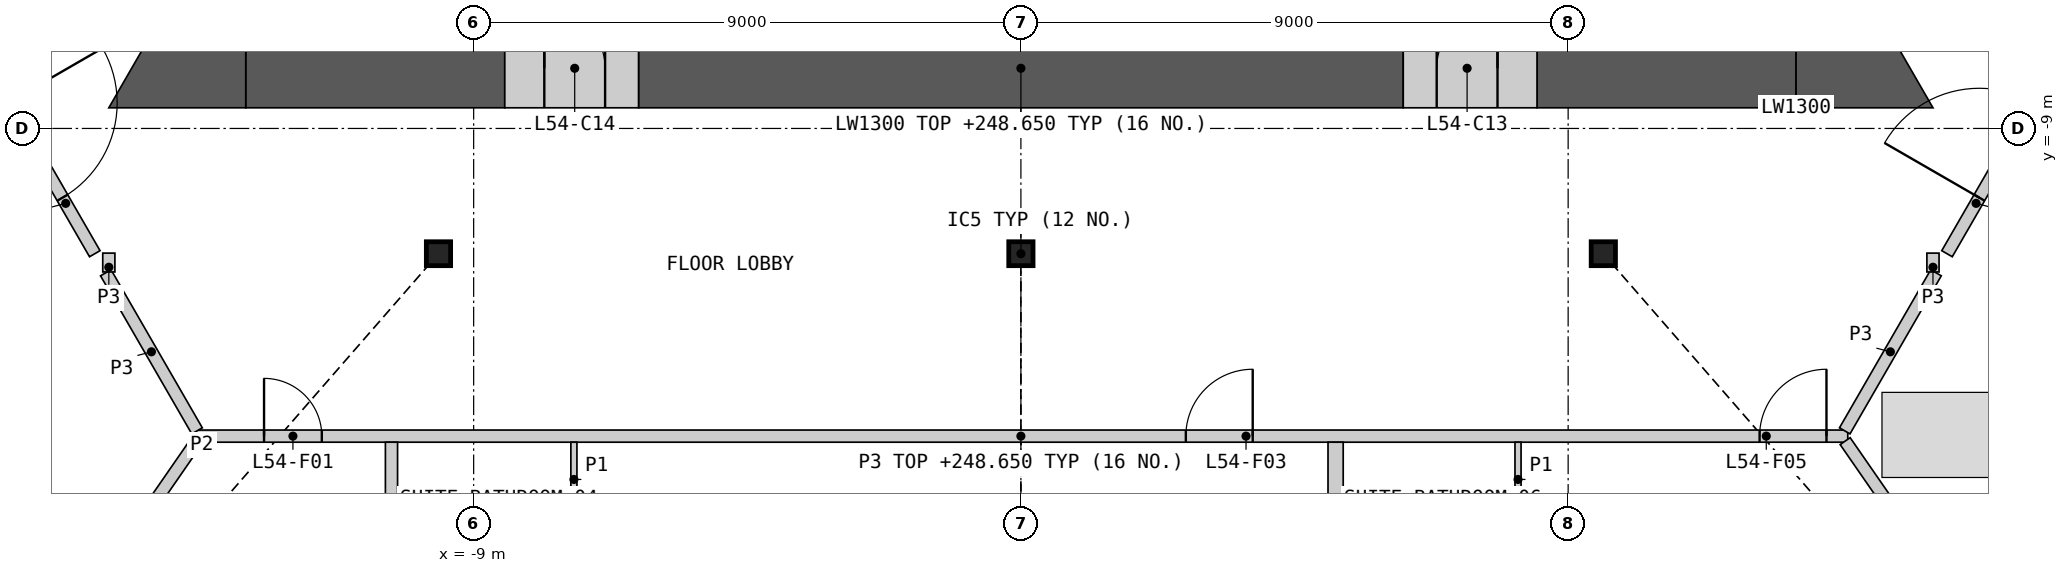
"""IFC4 building model, lengths in metres.
Left out: names, types, materials, properties, quantities, classifications, styles, units other than length and angle.
Written with IfcOpenShell. Run it as: python <this file> out.ifc"""

import sys

from ifc_helpers import new_model, si_unit, direction, frame, frame_2d, origin, origin_2d, place, context, subcontext, project, spatial, polyline, rectangle, i_section, outline, extrude, element, fill, save


model = new_model("IFC4")
c1 = context("Model", 3, precision=1e-05, world=origin(), true_north=direction((0.0, 1.0)))
c2 = subcontext(c1, "Body", "Model", "MODEL_VIEW")
j1 = project(units=[si_unit("LENGTHUNIT", "METRE"), si_unit("PLANEANGLEUNIT", "RADIAN")], contexts=[c1])
p1 = place(None, origin())
s1 = spatial("IfcSite", under=j1, at=p1, CompositionType="ELEMENT")
p2 = place(p1, origin())
s2 = spatial("IfcBuilding", under=s1, at=p2, CompositionType="ELEMENT")
p3 = place(p2, frame((0.0, 0.0, 245.4)))
s3 = spatial("IfcBuildingStorey", under=s2, at=p3, CompositionType="ELEMENT", Elevation=245.4)
for number, where, z_axis, x_axis in (
    (1, (-9.578, -11.06, 0.0), (0.0, 0.0, 1.0), (1.0, 0.0, 0.0)),
    (2, (0.0, -11.06, 0.0), (0.0, 0.0, 1.0), (1.0, 0.0, 0.0)),
    (3, (9.578, -11.06, 0.0), (0.0, 0.0, 1.0), (1.0, 0.0, 0.0)),
):
    element("IfcColumn", number, at=place(p3, frame(where, z_axis=z_axis, x_axis=x_axis)), inside=s3, PredefinedType="COLUMN", context=c2, shape_type="SweptSolid", body=[
        extrude(i_section(OverallWidth=0.399, OverallDepth=0.393, WebThickness=0.023, FlangeThickness=0.037, at=origin_2d()), origin(), (0.0, 0.0, 1.0), 3.6),
    ])
p4 = place(p3, frame((-6.288, -8.01, 0.0), z_axis=(0.0, 0.0, 1.0), x_axis=(1.0, 0.0, 0.0)))
e4 = element("IfcWall", 4, at=p4, inside=s3, PredefinedType="SHEAR", context=c2, shape_type="SweptSolid", body=[
    extrude(rectangle(XDim=12.576, YDim=1.3, at=frame_2d((6.288, 0.0))), origin(), (0.0, 0.0, 1.0), 3.25),
])
for number, where, z_axis, x_axis in (
    (5, (8.488, -8.01, 0.0), (0.0, 0.0, 1.0), (1.0, 0.0, 0.0)),
    (6, (-12.748, -8.01, 0.0), (0.0, 0.0, 1.0), (1.0, 0.0, 0.0)),
):
    element("IfcWall", number, at=place(p3, frame(where, z_axis=z_axis, x_axis=x_axis)), inside=s3, PredefinedType="SHEAR", context=c2, shape_type="SweptSolid", body=[
        extrude(rectangle(XDim=4.26, YDim=1.3, at=frame_2d((2.13, 0.0))), origin(), (0.0, 0.0, 1.0), 3.25),
    ])
p5 = place(p3, origin())
e7 = element("IfcWall", 7, at=p5, inside=s3, PredefinedType="SHEAR", context=c2, shape_type="SweptSolid", body=[
    extrude(outline(polyline([(12.748, -8.66), (12.748, -7.36), (13.874, -6.71), (15.0, -8.66), (12.748, -8.66)])), origin(), (0.0, 0.0, 1.0), 3.25),
])
p6 = place(p3, origin())
e8 = element("IfcWall", 8, at=p6, inside=s3, PredefinedType="SHEAR", context=c2, shape_type="SweptSolid", body=[
    extrude(outline(polyline([(-13.874, -6.71), (-12.748, -7.36), (-12.748, -8.66), (-15.0, -8.66), (-13.874, -6.71)])), origin(), (0.0, 0.0, 1.0), 3.25),
])
p7 = place(p3, frame((6.288, -8.01, 0.0), z_axis=(0.0, 0.0, 1.0), x_axis=(1.0, 0.0, 0.0)))
e9 = element("IfcWall", 9, at=p7, inside=s3, PredefinedType="SHEAR", context=c2, shape_type="SweptSolid", body=[
    extrude(rectangle(XDim=2.2, YDim=1.3, at=frame_2d((1.1, 0.0))), origin(), (0.0, 0.0, 1.0), 3.25),
])
p8 = place(p7, frame((0.55, 0.0, 0.0)))
e10 = element("IfcOpeningElement", 10, at=p8, cuts=e9, PredefinedType="OPENING", context=c2, shape_type="SweptSolid", body=[
    extrude(rectangle(XDim=1.0, YDim=2.1, at=frame_2d((0.5, 1.05))), frame((0.0, 0.66, 0.0), z_axis=(0.0, -1.0, 0.0), x_axis=(1.0, 0.0, 0.0)), (0.0, 0.0, 1.0), 1.32),
])
p9 = place(p3, frame((-8.488, -8.01, 0.0), z_axis=(0.0, 0.0, 1.0), x_axis=(1.0, 0.0, 0.0)))
e11 = element("IfcWall", 11, at=p9, inside=s3, PredefinedType="SHEAR", context=c2, shape_type="SweptSolid", body=[
    extrude(rectangle(XDim=2.2, YDim=1.3, at=frame_2d((1.1, 0.0))), origin(), (0.0, 0.0, 1.0), 3.25),
])
p10 = place(p9, frame((0.65, 0.0, 0.0)))
e12 = element("IfcOpeningElement", 12, at=p10, cuts=e11, PredefinedType="OPENING", context=c2, shape_type="SweptSolid", body=[
    extrude(rectangle(XDim=1.0, YDim=2.1, at=frame_2d((0.5, 1.05))), frame((0.0, 0.66, 0.0), z_axis=(0.0, -1.0, 0.0), x_axis=(1.0, 0.0, 0.0)), (0.0, 0.0, 1.0), 1.32),
])
p11 = place(p3, frame((-13.599, -14.06, 0.0), z_axis=(0.0, 0.0, 1.0), x_axis=(1.0, 0.0, 0.0)))
e13 = element("IfcWall", 13, at=p11, inside=s3, PredefinedType="PARTITIONING", context=c2, shape_type="SweptSolid", body=[
    extrude(rectangle(XDim=27.198, YDim=0.2, at=frame_2d((13.599, 0.0))), origin(), (0.0, 0.0, 1.0), 3.25),
])
p12 = place(p11, frame((1.152, 0.0, 0.0)))
e14 = element("IfcOpeningElement", 14, at=p12, cuts=e13, PredefinedType="OPENING", context=c2, shape_type="SweptSolid", body=[
    extrude(rectangle(XDim=0.95, YDim=2.1, at=frame_2d((0.475, 1.05))), frame((0.0, 0.11, 0.0), z_axis=(0.0, -1.0, 0.0), x_axis=(1.0, 0.0, 0.0)), (0.0, 0.0, 1.0), 0.22),
])
p13 = place(p11, frame((16.311, 0.0, 0.0)))
e15 = element("IfcOpeningElement", 15, at=p13, cuts=e13, PredefinedType="OPENING", context=c2, shape_type="SweptSolid", body=[
    extrude(rectangle(XDim=1.1, YDim=2.1, at=frame_2d((0.55, 1.05))), frame((0.0, 0.11, 0.0), z_axis=(0.0, -1.0, 0.0), x_axis=(1.0, 0.0, 0.0)), (0.0, 0.0, 1.0), 0.22),
])
p14 = place(p11, frame((25.747, 0.0, 0.0)))
e16 = element("IfcOpeningElement", 16, at=p14, cuts=e13, PredefinedType="OPENING", context=c2, shape_type="SweptSolid", body=[
    extrude(rectangle(XDim=1.1, YDim=2.1, at=frame_2d((0.55, 1.05))), frame((0.0, 0.11, 0.0), z_axis=(0.0, -1.0, 0.0), x_axis=(1.0, 0.0, 0.0)), (0.0, 0.0, 1.0), 0.22),
])
p15 = place(p3, frame((-17.244, -7.747, 0.0), z_axis=(0.0, 0.0, 1.0), x_axis=(0.500017753321, 0.866015153657, 0.0)))
e17 = element("IfcWall", 17, at=p15, inside=s3, PredefinedType="PARTITIONING", context=c2, shape_type="SweptSolid", body=[
    extrude(rectangle(XDim=5.51, YDim=0.2, at=frame_2d((2.755, 0.0))), origin(), (0.0, 0.0, 1.0), 3.25),
])
p16 = place(p15, frame((0.401, 0.0, 0.0)))
e18 = element("IfcOpeningElement", 18, at=p16, cuts=e17, PredefinedType="OPENING", context=c2, shape_type="SweptSolid", body=[
    extrude(rectangle(XDim=1.1, YDim=2.1, at=frame_2d((0.55, 1.05))), frame((0.0, 0.11, 0.0), z_axis=(0.0, -1.0, 0.0), x_axis=(1.0, 0.0, 0.0)), (0.0, 0.0, 1.0), 0.22),
])
p17 = place(p3, frame((14.489, -2.975, 0.0), z_axis=(0.0, 0.0, 1.0), x_axis=(0.500017753321, -0.866015153657, 0.0)))
e19 = element("IfcWall", 19, at=p17, inside=s3, PredefinedType="PARTITIONING", context=c2, shape_type="SweptSolid", body=[
    extrude(rectangle(XDim=5.51, YDim=0.2, at=frame_2d((2.755, 0.0))), origin(), (0.0, 0.0, 1.0), 3.25),
])
p18 = place(p17, frame((4.06, 0.0, 0.0)))
e20 = element("IfcOpeningElement", 20, at=p18, cuts=e19, PredefinedType="OPENING", context=c2, shape_type="SweptSolid", body=[
    extrude(rectangle(XDim=1.1, YDim=2.1, at=frame_2d((0.55, 1.05))), frame((0.0, 0.11, 0.0), z_axis=(0.0, -1.0, 0.0), x_axis=(1.0, 0.0, 0.0)), (0.0, 0.0, 1.0), 0.22),
])
p19 = place(p3, frame((5.176, -18.855, 0.0), z_axis=(0.0, 0.0, 1.0), x_axis=(0.0, 1.0, 0.0)))
e21 = element("IfcWall", 21, at=p19, inside=s3, PredefinedType="PARTITIONING", context=c2, shape_type="SweptSolid", body=[
    extrude(rectangle(XDim=4.695, YDim=0.25, at=frame_2d((2.348, 0.0))), origin(), (0.0, 0.0, 1.0), 2.404),
])
p20 = place(p3, frame((15.231, -11.06, 0.0), z_axis=(0.0, 0.0, 1.0), x_axis=(0.499961815444, 0.866047448526, 0.0)))
e22 = element("IfcWall", 22, at=p20, inside=s3, PredefinedType="PARTITIONING", context=c2, shape_type="SweptSolid", body=[
    extrude(rectangle(XDim=3.826, YDim=0.2, at=frame_2d((1.913, 0.0))), origin(), (0.0, 0.0, 1.0), 3.25),
])
p21 = place(p20, frame((1.064, 0.0, 0.0)))
e23 = element("IfcOpeningElement", 23, at=p21, cuts=e22, PredefinedType="OPENING", context=c2, shape_type="SweptSolid", body=[
    extrude(rectangle(XDim=1.8, YDim=2.1, at=frame_2d((0.9, 1.05))), frame((0.0, 0.11, 0.0), z_axis=(0.0, -1.0, 0.0), x_axis=(1.0, 0.0, 0.0)), (0.0, 0.0, 1.0), 0.22),
])
p22 = place(p3, frame((-17.144, -7.747, 0.0), z_axis=(0.0, 0.0, 1.0), x_axis=(0.499961815444, -0.866047448526, 0.0)))
e24 = element("IfcWall", 24, at=p22, inside=s3, PredefinedType="PARTITIONING", context=c2, shape_type="SweptSolid", body=[
    extrude(rectangle(XDim=3.826, YDim=0.2, at=frame_2d((1.913, 0.0))), origin(), (0.0, 0.0, 1.0), 3.25),
])
p23 = place(p22, frame((0.962, 0.0, 0.0)))
e25 = element("IfcOpeningElement", 25, at=p23, cuts=e24, PredefinedType="OPENING", context=c2, shape_type="SweptSolid", body=[
    extrude(rectangle(XDim=1.8, YDim=2.1, at=frame_2d((0.9, 1.05))), frame((0.0, 0.11, 0.0), z_axis=(0.0, -1.0, 0.0), x_axis=(1.0, 0.0, 0.0)), (0.0, 0.0, 1.0), 0.22),
])
for number, where, z_axis, x_axis in (
    (26, (13.549, -13.974, 0.0), (0.0, 0.0, 1.0), (0.5, 0.866, 0.0)),
    (27, (-15.05, -11.374, 0.0), (0.0, 0.0, 1.0), (0.5, -0.866, 0.0)),
):
    element("IfcWall", number, at=place(p3, frame(where, z_axis=z_axis, x_axis=x_axis)), inside=s3, PredefinedType="PARTITIONING", context=c2, shape_type="SweptSolid", body=[
        extrude(rectangle(XDim=3.002, YDim=0.2, at=frame_2d((1.501, 0.0))), origin(), (0.0, 0.0, 1.0), 3.25),
    ])
for number, where, z_axis, x_axis in (
    (28, (15.0, -11.36, 0.0), (0.0, 0.0, 1.0), (0.0, 1.0, 0.0)),
    (29, (-15.0, -11.36, 0.0), (0.0, 0.0, 1.0), (0.0, 1.0, 0.0)),
):
    element("IfcWall", number, at=place(p3, frame(where, z_axis=z_axis, x_axis=x_axis)), inside=s3, PredefinedType="PARTITIONING", context=c2, shape_type="SweptSolid", body=[
        extrude(rectangle(XDim=0.31, YDim=0.2, at=frame_2d((0.155, 0.0))), origin(), (0.0, 0.0, 1.0), 3.25),
    ])
p24 = place(p3, origin())
e30 = element("IfcWall", 30, at=p24, inside=s3, PredefinedType="PARTITIONING", context=c2, shape_type="SweptSolid", body=[
    extrude(outline(polyline([(-13.473, -14.199), (-19.794, -23.331), (-20.439, -23.912), (-13.638, -14.086), (-13.473, -14.199)])), origin(), (0.0, 0.0, 1.0), 2.404),
])
p25 = place(p3, frame((13.556, -14.143, 0.0), z_axis=(0.0, 0.0, 1.0), x_axis=(0.56913494803, -0.82224413098, 0.0)))
e31 = element("IfcWall", 31, at=p25, inside=s3, PredefinedType="PARTITIONING", context=c2, shape_type="SweptSolid", body=[
    extrude(rectangle(XDim=12.014, YDim=0.2, at=frame_2d((6.007, 0.0))), origin(), (0.0, 0.0, 1.0), 2.404),
])
p26 = place(p3, frame((-10.351, -23.527, 0.0), z_axis=(0.0, 0.0, 1.0), x_axis=(0.0, 1.0, 0.0)))
e32 = element("IfcWall", 32, at=p26, inside=s3, PredefinedType="PARTITIONING", context=c2, shape_type="SweptSolid", body=[
    extrude(rectangle(XDim=9.366, YDim=0.2, at=frame_2d((4.683, 0.0))), origin(), (0.0, 0.0, 1.0), 2.404),
])
p27 = place(p3, frame((-7.351, -16.61, 0.0), z_axis=(0.0, 0.0, 1.0), x_axis=(0.0, 1.0, 0.0)))
e33 = element("IfcWall", 33, at=p27, inside=s3, PredefinedType="PARTITIONING", context=c2, shape_type="SweptSolid", body=[
    extrude(rectangle(XDim=2.45, YDim=0.1, at=frame_2d((1.225, 0.0))), origin(), (0.0, 0.0, 1.0), 2.404),
])
p28 = place(p27, frame((0.25, 0.0, 0.0)))
e34 = element("IfcOpeningElement", 34, at=p28, cuts=e33, PredefinedType="OPENING", context=c2, shape_type="SweptSolid", body=[
    extrude(rectangle(XDim=0.95, YDim=2.1, at=frame_2d((0.475, 1.05))), frame((0.0, 0.06, 0.0), z_axis=(0.0, -1.0, 0.0), x_axis=(1.0, 0.0, 0.0)), (0.0, 0.0, 1.0), 0.12),
])
p29 = place(p3, frame((8.176, -16.61, 0.0), z_axis=(0.0, 0.0, 1.0), x_axis=(0.0, 1.0, 0.0)))
e35 = element("IfcWall", 35, at=p29, inside=s3, PredefinedType="PARTITIONING", context=c2, shape_type="SweptSolid", body=[
    extrude(rectangle(XDim=2.45, YDim=0.1, at=frame_2d((1.225, 0.0))), origin(), (0.0, 0.0, 1.0), 2.404),
])
p30 = place(p29, frame((0.25, 0.0, 0.0)))
e36 = element("IfcOpeningElement", 36, at=p30, cuts=e35, PredefinedType="OPENING", context=c2, shape_type="SweptSolid", body=[
    extrude(rectangle(XDim=0.95, YDim=2.1, at=frame_2d((0.475, 1.05))), frame((0.0, 0.06, 0.0), z_axis=(0.0, -1.0, 0.0), x_axis=(1.0, 0.0, 0.0)), (0.0, 0.0, 1.0), 0.12),
])
p31 = place(p12, origin())
e37 = element("IfcDoor", 37, at=p31, inside=s3, OperationType="SINGLE_SWING_LEFT", PredefinedType="DOOR", context=c2, shape_type="SweptSolid", body=[
    extrude(rectangle(XDim=0.95, YDim=2.1, at=frame_2d((0.475, 1.05))), frame((0.0, 0.025, 0.0), z_axis=(0.0, -1.0, 0.0), x_axis=(1.0, 0.0, 0.0)), (0.0, 0.0, 1.0), 0.05),
])
fill(e14, e37)
p32 = place(p13, origin())
e38 = element("IfcDoor", 38, at=p32, inside=s3, OperationType="SINGLE_SWING_RIGHT", PredefinedType="DOOR", context=c2, shape_type="SweptSolid", body=[
    extrude(rectangle(XDim=1.1, YDim=2.1, at=frame_2d((0.55, 1.05))), frame((0.0, 0.025, 0.0), z_axis=(0.0, -1.0, 0.0), x_axis=(1.0, 0.0, 0.0)), (0.0, 0.0, 1.0), 0.05),
])
fill(e15, e38)
p33 = place(p14, origin())
e39 = element("IfcDoor", 39, at=p33, inside=s3, OperationType="SINGLE_SWING_RIGHT", PredefinedType="DOOR", context=c2, shape_type="SweptSolid", body=[
    extrude(rectangle(XDim=1.1, YDim=2.1, at=frame_2d((0.55, 1.05))), frame((0.0, 0.025, 0.0), z_axis=(0.0, -1.0, 0.0), x_axis=(1.0, 0.0, 0.0)), (0.0, 0.0, 1.0), 0.05),
])
fill(e16, e39)
p34 = place(p21, origin())
e40 = element("IfcDoor", 40, at=p34, inside=s3, OperationType="DOUBLE_DOOR_SINGLE_SWING", PredefinedType="DOOR", context=c2, shape_type="SweptSolid", body=[
    extrude(rectangle(XDim=1.8, YDim=2.1, at=frame_2d((0.9, 1.05))), frame((0.0, 0.025, 0.0), z_axis=(0.0, -1.0, 0.0), x_axis=(1.0, 0.0, 0.0)), (0.0, 0.0, 1.0), 0.05),
])
fill(e23, e40)
p35 = place(p23, origin())
e41 = element("IfcDoor", 41, at=p35, inside=s3, OperationType="DOUBLE_DOOR_SINGLE_SWING", PredefinedType="DOOR", context=c2, shape_type="SweptSolid", body=[
    extrude(rectangle(XDim=1.8, YDim=2.1, at=frame_2d((0.9, 1.05))), frame((0.0, 0.025, 0.0), z_axis=(0.0, -1.0, 0.0), x_axis=(1.0, 0.0, 0.0)), (0.0, 0.0, 1.0), 0.05),
])
fill(e25, e41)
save(model, sys.argv[1])
